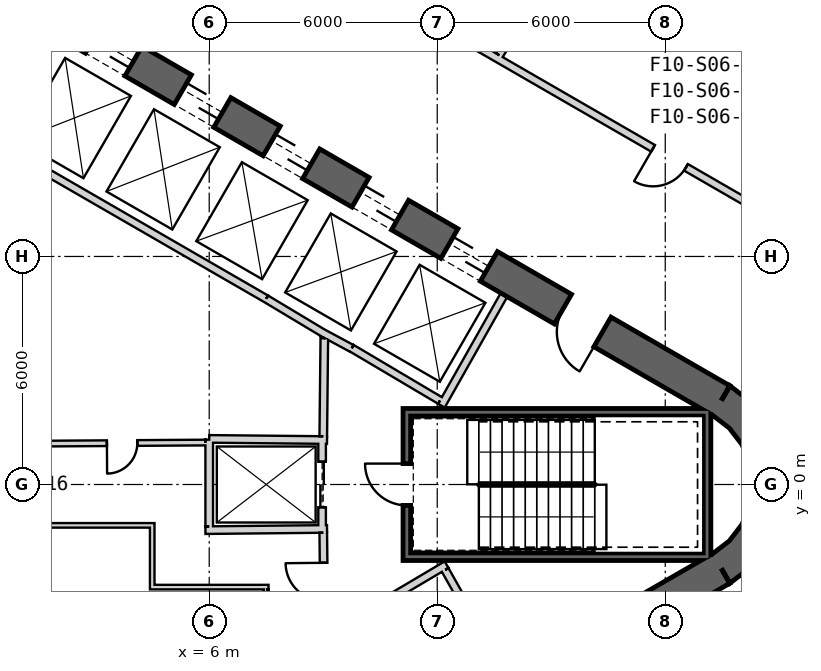
"""IFC4 building model, lengths in metres.
Left out: names, types, materials, properties, quantities, classifications, styles, units other than length and angle.
Written with IfcOpenShell. Run it as: python <this file> out.ifc"""

import sys

from ifc_helpers import new_model, si_unit, direction, frame, frame_2d, origin, place, context, subcontext, project, spatial, polyline, rectangle, outline, extrude, element, fill, save


model = new_model("IFC4")
c1 = context("Model", 3, precision=1e-05, world=origin(), true_north=direction((0.0, 1.0)))
c2 = subcontext(c1, "Body", "Model", "MODEL_VIEW")
j1 = project(units=[si_unit("LENGTHUNIT", "METRE"), si_unit("PLANEANGLEUNIT", "RADIAN")], contexts=[c1])
p1 = place(None, origin())
s1 = spatial("IfcSite", under=j1, at=p1, CompositionType="ELEMENT")
p2 = place(p1, origin())
s2 = spatial("IfcBuilding", under=s1, at=p2, CompositionType="ELEMENT")
p3 = place(p2, frame((0.0, 0.0, 119.3)))
s3 = spatial("IfcBuildingStorey", under=s2, at=p3, CompositionType="ELEMENT", Elevation=119.3)
p4 = place(p3, frame((19.475, 2.208, 0.0), z_axis=(0.0, 0.0, 1.0), x_axis=(-0.866028369851, 0.499994862586, 0.0)))
e1 = element("IfcWall", 1, at=p4, inside=s3, PredefinedType="SHEAR", context=c2, shape_type="SweptSolid", body=[
    extrude(rectangle(XDim=31.523, YDim=0.9, at=frame_2d((15.762, 0.0))), origin(), (0.0, 0.0, 1.0), 4.1),
])
p5 = place(p4, frame((7.062, 0.0, 0.0)))
e2 = element("IfcOpeningElement", 2, at=p5, cuts=e1, PredefinedType="OPENING", context=c2, shape_type="SweptSolid", body=[
    extrude(rectangle(XDim=1.2, YDim=2.4, at=frame_2d((0.6, 1.2))), frame((0.0, 0.46, 0.0), z_axis=(0.0, -1.0, 0.0), x_axis=(1.0, 0.0, 0.0)), (0.0, 0.0, 1.0), 0.92),
])
p6 = place(p4, frame((9.762, 0.0, 0.0)))
e3 = element("IfcOpeningElement", 3, at=p6, cuts=e1, PredefinedType="OPENING", context=c2, shape_type="SweptSolid", body=[
    extrude(rectangle(XDim=1.2, YDim=2.4, at=frame_2d((0.6, 1.2))), frame((0.0, 0.46, 0.0), z_axis=(0.0, -1.0, 0.0), x_axis=(1.0, 0.0, 0.0)), (0.0, 0.0, 1.0), 0.92),
])
p7 = place(p4, frame((12.462, 0.0, 0.0)))
e4 = element("IfcOpeningElement", 4, at=p7, cuts=e1, PredefinedType="OPENING", context=c2, shape_type="SweptSolid", body=[
    extrude(rectangle(XDim=1.2, YDim=2.4, at=frame_2d((0.6, 1.2))), frame((0.0, 0.46, 0.0), z_axis=(0.0, -1.0, 0.0), x_axis=(1.0, 0.0, 0.0)), (0.0, 0.0, 1.0), 0.92),
])
p8 = place(p4, frame((15.162, 0.0, 0.0)))
e5 = element("IfcOpeningElement", 5, at=p8, cuts=e1, PredefinedType="OPENING", context=c2, shape_type="SweptSolid", body=[
    extrude(rectangle(XDim=1.2, YDim=2.4, at=frame_2d((0.6, 1.2))), frame((0.0, 0.46, 0.0), z_axis=(0.0, -1.0, 0.0), x_axis=(1.0, 0.0, 0.0)), (0.0, 0.0, 1.0), 0.92),
])
p9 = place(p4, frame((17.862, 0.0, 0.0)))
e6 = element("IfcOpeningElement", 6, at=p9, cuts=e1, PredefinedType="OPENING", context=c2, shape_type="SweptSolid", body=[
    extrude(rectangle(XDim=1.2, YDim=2.4, at=frame_2d((0.6, 1.2))), frame((0.0, 0.46, 0.0), z_axis=(0.0, -1.0, 0.0), x_axis=(1.0, 0.0, 0.0)), (0.0, 0.0, 1.0), 0.92),
])
p10 = place(p4, frame((20.562, 0.0, 0.0)))
e7 = element("IfcOpeningElement", 7, at=p10, cuts=e1, PredefinedType="OPENING", context=c2, shape_type="SweptSolid", body=[
    extrude(rectangle(XDim=1.2, YDim=2.4, at=frame_2d((0.6, 1.2))), frame((0.0, 0.46, 0.0), z_axis=(0.0, -1.0, 0.0), x_axis=(1.0, 0.0, 0.0)), (0.0, 0.0, 1.0), 0.92),
])
p11 = place(p4, frame((23.262, 0.0, 0.0)))
e8 = element("IfcOpeningElement", 8, at=p11, cuts=e1, PredefinedType="OPENING", context=c2, shape_type="SweptSolid", body=[
    extrude(rectangle(XDim=1.2, YDim=2.4, at=frame_2d((0.6, 1.2))), frame((0.0, 0.46, 0.0), z_axis=(0.0, -1.0, 0.0), x_axis=(1.0, 0.0, 0.0)), (0.0, 0.0, 1.0), 0.92),
])
p12 = place(p4, frame((3.612, 0.0, 0.0)))
e9 = element("IfcOpeningElement", 9, at=p12, cuts=e1, PredefinedType="OPENING", context=c2, shape_type="SweptSolid", body=[
    extrude(rectangle(XDim=1.2, YDim=2.4, at=frame_2d((0.6, 1.2))), frame((0.0, 0.46, 0.0), z_axis=(0.0, -1.0, 0.0), x_axis=(1.0, 0.0, 0.0)), (0.0, 0.0, 1.0), 0.92),
])
p13 = place(p4, frame((26.712, 0.0, 0.0)))
e10 = element("IfcOpeningElement", 10, at=p13, cuts=e1, PredefinedType="OPENING", context=c2, shape_type="SweptSolid", body=[
    extrude(rectangle(XDim=1.2, YDim=2.4, at=frame_2d((0.6, 1.2))), frame((0.0, 0.46, 0.0), z_axis=(0.0, -1.0, 0.0), x_axis=(1.0, 0.0, 0.0)), (0.0, 0.0, 1.0), 0.92),
])
p14 = place(p3, frame((-7.825, -17.97, 0.0), z_axis=(0.0, 0.0, 1.0), x_axis=(0.866028369851, 0.499994862586, 0.0)))
e11 = element("IfcWall", 11, at=p14, inside=s3, PredefinedType="SHEAR", context=c2, shape_type="SweptSolid", body=[
    extrude(rectangle(XDim=31.523, YDim=0.9, at=frame_2d((15.762, 0.0))), origin(), (0.0, 0.0, 1.0), 4.1),
])
p15 = place(p14, frame((7.062, 0.0, 0.0)))
e12 = element("IfcOpeningElement", 12, at=p15, cuts=e11, PredefinedType="OPENING", context=c2, shape_type="SweptSolid", body=[
    extrude(rectangle(XDim=1.2, YDim=2.4, at=frame_2d((0.6, 1.2))), frame((0.0, 0.46, 0.0), z_axis=(0.0, -1.0, 0.0), x_axis=(1.0, 0.0, 0.0)), (0.0, 0.0, 1.0), 0.92),
])
p16 = place(p14, frame((9.762, 0.0, 0.0)))
e13 = element("IfcOpeningElement", 13, at=p16, cuts=e11, PredefinedType="OPENING", context=c2, shape_type="SweptSolid", body=[
    extrude(rectangle(XDim=1.2, YDim=2.4, at=frame_2d((0.6, 1.2))), frame((0.0, 0.46, 0.0), z_axis=(0.0, -1.0, 0.0), x_axis=(1.0, 0.0, 0.0)), (0.0, 0.0, 1.0), 0.92),
])
p17 = place(p14, frame((12.462, 0.0, 0.0)))
e14 = element("IfcOpeningElement", 14, at=p17, cuts=e11, PredefinedType="OPENING", context=c2, shape_type="SweptSolid", body=[
    extrude(rectangle(XDim=1.2, YDim=2.4, at=frame_2d((0.6, 1.2))), frame((0.0, 0.46, 0.0), z_axis=(0.0, -1.0, 0.0), x_axis=(1.0, 0.0, 0.0)), (0.0, 0.0, 1.0), 0.92),
])
p18 = place(p14, frame((15.162, 0.0, 0.0)))
e15 = element("IfcOpeningElement", 15, at=p18, cuts=e11, PredefinedType="OPENING", context=c2, shape_type="SweptSolid", body=[
    extrude(rectangle(XDim=1.2, YDim=2.4, at=frame_2d((0.6, 1.2))), frame((0.0, 0.46, 0.0), z_axis=(0.0, -1.0, 0.0), x_axis=(1.0, 0.0, 0.0)), (0.0, 0.0, 1.0), 0.92),
])
p19 = place(p14, frame((17.862, 0.0, 0.0)))
e16 = element("IfcOpeningElement", 16, at=p19, cuts=e11, PredefinedType="OPENING", context=c2, shape_type="SweptSolid", body=[
    extrude(rectangle(XDim=1.2, YDim=2.4, at=frame_2d((0.6, 1.2))), frame((0.0, 0.46, 0.0), z_axis=(0.0, -1.0, 0.0), x_axis=(1.0, 0.0, 0.0)), (0.0, 0.0, 1.0), 0.92),
])
p20 = place(p14, frame((20.562, 0.0, 0.0)))
e17 = element("IfcOpeningElement", 17, at=p20, cuts=e11, PredefinedType="OPENING", context=c2, shape_type="SweptSolid", body=[
    extrude(rectangle(XDim=1.2, YDim=2.4, at=frame_2d((0.6, 1.2))), frame((0.0, 0.46, 0.0), z_axis=(0.0, -1.0, 0.0), x_axis=(1.0, 0.0, 0.0)), (0.0, 0.0, 1.0), 0.92),
])
p21 = place(p14, frame((26.712, 0.0, 0.0)))
e18 = element("IfcOpeningElement", 18, at=p21, cuts=e11, PredefinedType="OPENING", context=c2, shape_type="SweptSolid", body=[
    extrude(rectangle(XDim=1.2, YDim=2.4, at=frame_2d((0.6, 1.2))), frame((0.0, 0.46, 0.0), z_axis=(0.0, -1.0, 0.0), x_axis=(1.0, 0.0, 0.0)), (0.0, 0.0, 1.0), 0.92),
])
p22 = place(p14, frame((3.612, 0.0, 0.0)))
e19 = element("IfcOpeningElement", 19, at=p22, cuts=e11, PredefinedType="OPENING", context=c2, shape_type="SweptSolid", body=[
    extrude(rectangle(XDim=1.2, YDim=2.4, at=frame_2d((0.6, 1.2))), frame((0.0, 0.46, 0.0), z_axis=(0.0, -1.0, 0.0), x_axis=(1.0, 0.0, 0.0)), (0.0, 0.0, 1.0), 0.92),
])
p23 = place(p3, origin())
e20 = element("IfcWall", 20, at=p23, inside=s3, PredefinedType="SHEAR", context=c2, shape_type="SweptSolid", body=[
    extrude(outline(polyline([(19.7, -2.598), (20.321, -2.121), (20.798, -1.5), (21.098, -0.777), (21.2, 0.0), (21.098, 0.777), (20.798, 1.5), (20.321, 2.121), (19.7, 2.598), (19.25, 1.819), (19.685, 1.485), (20.019, 1.05), (20.229, 0.543), (20.3, 0.0), (20.229, -0.543), (20.019, -1.05), (19.685, -1.485), (19.25, -1.819), (19.7, -2.598)])), origin(), (0.0, 0.0, 1.0), 4.1),
])
p24 = place(p3, frame((7.497, 4.886, 0.0), z_axis=(0.0, 0.0, 1.0), x_axis=(-0.866030989016, 0.499990325971, 0.0)))
e21 = element("IfcWall", 21, at=p24, inside=s3, PredefinedType="PLUMBINGWALL", context=c2, shape_type="SweptSolid", body=[
    extrude(rectangle(XDim=8.1, YDim=0.2, at=frame_2d((4.05, 0.0))), origin(), (0.0, 0.0, 1.0), 3.8),
])
p25 = place(p3, frame((12.11, 2.073, 0.0), z_axis=(0.0, 0.0, 1.0), x_axis=(0.49196600604, 0.870614408852, 0.0)))
e22 = element("IfcWall", 22, at=p25, inside=s3, PredefinedType="PLUMBINGWALL", context=c2, shape_type="SweptSolid", body=[
    extrude(rectangle(XDim=3.35, YDim=0.2, at=frame_2d((1.675, 0.0))), origin(), (0.0, 0.0, 1.0), 3.8),
])
p26 = place(p3, frame((12.073, 2.211, 0.0), z_axis=(0.0, 0.0, 1.0), x_axis=(-0.860438357912, 0.509554542943, 0.0)))
e23 = element("IfcWall", 23, at=p26, inside=s3, PredefinedType="PLUMBINGWALL", context=c2, shape_type="SweptSolid", body=[
    extrude(rectangle(XDim=2.7, YDim=0.2, at=frame_2d((1.35, 0.0))), origin(), (0.0, 0.0, 1.0), 3.8),
])
p27 = place(p3, frame((9.748, 3.583, 0.0), z_axis=(0.0, 0.0, 1.0), x_axis=(-0.880917147855, 0.473270513147, 0.0)))
e24 = element("IfcWall", 24, at=p27, inside=s3, PredefinedType="PLUMBINGWALL", context=c2, shape_type="SweptSolid", body=[
    extrude(rectangle(XDim=0.878, YDim=0.2, at=frame_2d((0.439, 0.0))), origin(), (0.0, 0.0, 1.0), 3.8),
])
p28 = place(p3, frame((9.079, 3.937, 0.0), z_axis=(0.0, 0.0, 1.0), x_axis=(-0.857516281273, 0.51445682749, 0.0)))
e25 = element("IfcWall", 25, at=p28, inside=s3, PredefinedType="PLUMBINGWALL", context=c2, shape_type="SweptSolid", body=[
    extrude(rectangle(XDim=1.845, YDim=0.2, at=frame_2d((0.922, 0.0))), origin(), (0.0, 0.0, 1.0), 3.8),
])
p29 = place(p3, frame((19.2, 1.9, -0.3), z_axis=(0.0, 0.0, 1.0), x_axis=(-1.0, 0.0, 0.0)))
e26 = element("IfcWall", 26, at=p29, inside=s3, PredefinedType="SHEAR", context=c2, shape_type="SweptSolid", body=[
    extrude(rectangle(XDim=8.1, YDim=0.2, at=frame_2d((4.05, 0.0))), origin(), (0.0, 0.0, 1.0), 4.1),
])
p30 = place(p3, frame((19.1, -2.0, -0.3), z_axis=(0.0, 0.0, 1.0), x_axis=(0.0, 1.0, 0.0)))
e27 = element("IfcWall", 27, at=p30, inside=s3, PredefinedType="SHEAR", context=c2, shape_type="SweptSolid", body=[
    extrude(rectangle(XDim=3.8, YDim=0.2, at=frame_2d((1.9, 0.0))), origin(), (0.0, 0.0, 1.0), 4.1),
])
p31 = place(p3, frame((11.1, -1.9, -0.3), z_axis=(0.0, 0.0, 1.0), x_axis=(1.0, 0.0, 0.0)))
e28 = element("IfcWall", 28, at=p31, inside=s3, PredefinedType="SHEAR", context=c2, shape_type="SweptSolid", body=[
    extrude(rectangle(XDim=7.9, YDim=0.2, at=frame_2d((3.95, 0.0))), origin(), (0.0, 0.0, 1.0), 4.1),
])
p32 = place(p3, frame((11.2, -1.8, -0.3), z_axis=(0.0, 0.0, 1.0), x_axis=(0.0, 1.0, 0.0)))
e29 = element("IfcWall", 29, at=p32, inside=s3, PredefinedType="SHEAR", context=c2, shape_type="SweptSolid", body=[
    extrude(rectangle(XDim=3.6, YDim=0.2, at=frame_2d((1.8, 0.0))), origin(), (0.0, 0.0, 1.0), 4.1),
])
p33 = place(p32, frame((1.25, 0.0, 0.3)))
e30 = element("IfcOpeningElement", 30, at=p33, cuts=e29, PredefinedType="OPENING", context=c2, shape_type="SweptSolid", body=[
    extrude(rectangle(XDim=1.1, YDim=2.1, at=frame_2d((0.55, 1.05))), frame((0.0, 0.11, 0.0), z_axis=(0.0, -1.0, 0.0), x_axis=(1.0, 0.0, 0.0)), (0.0, 0.0, 1.0), 0.22),
])
p34 = place(p3, frame((8.97, 1.2, 0.0), z_axis=(0.0, 0.0, 1.0), x_axis=(0.0, -1.0, 0.0)))
e31 = element("IfcWall", 31, at=p34, inside=s3, PredefinedType="PLUMBINGWALL", context=c2, shape_type="SweptSolid", body=[
    extrude(rectangle(XDim=2.4, YDim=0.2, at=frame_2d((1.2, 0.0))), origin(), (0.0, 0.0, 1.0), 3.8),
])
p35 = place(p34, frame((0.6, 0.0, 0.0)))
e32 = element("IfcOpeningElement", 32, at=p35, cuts=e31, PredefinedType="OPENING", context=c2, shape_type="SweptSolid", body=[
    extrude(rectangle(XDim=1.2, YDim=2.4, at=frame_2d((0.6, 1.2))), frame((0.0, 0.11, 0.0), z_axis=(0.0, -1.0, 0.0), x_axis=(1.0, 0.0, 0.0)), (0.0, 0.0, 1.0), 0.22),
])
p36 = place(p3, frame((6.0, 1.2, 0.0), z_axis=(0.0, 0.0, 1.0), x_axis=(0.999949988, -0.010001074852, 0.0)))
e33 = element("IfcWall", 33, at=p36, inside=s3, PredefinedType="PLUMBINGWALL", context=c2, shape_type="SweptSolid", body=[
    extrude(rectangle(XDim=3.1, YDim=0.2, at=frame_2d((1.55, 0.0))), origin(), (0.0, 0.0, 1.0), 3.8),
])
p37 = place(p3, frame((5.9, -1.201, 0.0), z_axis=(0.0, 0.0, 1.0), x_axis=(0.999950064753, 0.009993397809, 0.0)))
e34 = element("IfcWall", 34, at=p37, inside=s3, PredefinedType="PLUMBINGWALL", context=c2, shape_type="SweptSolid", body=[
    extrude(rectangle(XDim=3.2, YDim=0.2, at=frame_2d((1.6, 0.0))), origin(), (0.0, 0.0, 1.0), 3.8),
])
p38 = place(p3, frame((6.0, -1.1, 0.0), z_axis=(0.0, 0.0, 1.0), x_axis=(0.0, 1.0, 0.0)))
e35 = element("IfcWall", 35, at=p38, inside=s3, PredefinedType="PLUMBINGWALL", context=c2, shape_type="SweptSolid", body=[
    extrude(rectangle(XDim=2.28, YDim=0.2, at=frame_2d((1.14, 0.0))), origin(), (0.0, 0.0, 1.0), 3.8),
])
p39 = place(p3, frame((12.245, -2.109, 0.0), z_axis=(0.0, 0.0, 1.0), x_axis=(-0.860414880418, -0.509594185166, 0.0)))
e36 = element("IfcWall", 36, at=p39, inside=s3, PredefinedType="PARTITIONING", context=c2, shape_type="SweptSolid", body=[
    extrude(rectangle(XDim=2.7, YDim=0.2, at=frame_2d((1.35, 0.0))), origin(), (0.0, 0.0, 1.0), 3.8),
])
p40 = place(p3, frame((13.758, -4.99, 0.0), z_axis=(0.0, 0.0, 1.0), x_axis=(-0.491993409184, 0.87059892334, 0.0)))
e37 = element("IfcWall", 37, at=p40, inside=s3, PredefinedType="PARTITIONING", context=c2, shape_type="SweptSolid", body=[
    extrude(rectangle(XDim=3.15, YDim=0.2, at=frame_2d((1.575, 0.0))), origin(), (0.0, 0.0, 1.0), 3.8),
])
p41 = place(p40, frame((1.175, 0.0, 0.0)))
e38 = element("IfcOpeningElement", 38, at=p41, cuts=e37, PredefinedType="OPENING", context=c2, shape_type="SweptSolid", body=[
    extrude(rectangle(XDim=0.8, YDim=2.1, at=frame_2d((0.4, 1.05))), frame((0.0, 0.11, 0.0), z_axis=(0.0, -1.0, 0.0), x_axis=(1.0, 0.0, 0.0)), (0.0, 0.0, 1.0), 0.22),
])
p42 = place(p3, frame((9.001, 1.27, 0.0), z_axis=(0.0, 0.0, 1.0), x_axis=(0.010784614026, 0.999941844359, 0.0)))
e39 = element("IfcWall", 39, at=p42, inside=s3, PredefinedType="PARTITIONING", context=c2, shape_type="SweptSolid", body=[
    extrude(rectangle(XDim=2.581, YDim=0.2, at=frame_2d((1.291, 0.0))), origin(), (0.0, 0.0, 1.0), 3.8),
])
p43 = place(p3, frame((9.029, -3.851, 0.0), z_axis=(0.0, 0.0, 1.0), x_axis=(-0.010783593937, 0.99994185536, 0.0)))
e40 = element("IfcWall", 40, at=p43, inside=s3, PredefinedType="PARTITIONING", context=c2, shape_type="SweptSolid", body=[
    extrude(rectangle(XDim=2.581, YDim=0.2, at=frame_2d((1.291, 0.0))), origin(), (0.0, 0.0, 1.0), 3.8),
])
p44 = place(p43, frame((0.791, 0.0, 0.0)))
e41 = element("IfcOpeningElement", 41, at=p44, cuts=e40, PredefinedType="OPENING", context=c2, shape_type="SweptSolid", body=[
    extrude(rectangle(XDim=1.0, YDim=2.1, at=frame_2d((0.5, 1.05))), frame((0.0, 0.11, 0.0), z_axis=(0.0, -1.0, 0.0), x_axis=(1.0, 0.0, 0.0)), (0.0, 0.0, 1.0), 0.22),
])
p45 = place(p3, frame((1.388, 1.074, 0.0), z_axis=(0.0, 0.0, 1.0), x_axis=(0.99997856967, 0.006546770205, 0.0)))
e42 = element("IfcWall", 42, at=p45, inside=s3, PredefinedType="PLUMBINGWALL", context=c2, shape_type="SweptSolid", body=[
    extrude(rectangle(XDim=4.512, YDim=0.15, at=frame_2d((2.256, 0.0))), origin(), (0.0, 0.0, 1.0), 3.8),
])
p46 = place(p45, frame((1.92, 0.0, 0.0)))
e43 = element("IfcOpeningElement", 43, at=p46, cuts=e42, PredefinedType="OPENING", context=c2, shape_type="SweptSolid", body=[
    extrude(rectangle(XDim=0.8, YDim=2.1, at=frame_2d((0.4, 1.05))), frame((0.0, 0.085, 0.0), z_axis=(0.0, -1.0, 0.0), x_axis=(1.0, 0.0, 0.0)), (0.0, 0.0, 1.0), 0.17),
])
p47 = place(p3, frame((4.56, -1.075, 0.0), z_axis=(0.0, 0.0, 1.0), x_axis=(-1.0, 0.0, 0.0)))
e44 = element("IfcWall", 44, at=p47, inside=s3, PredefinedType="PARTITIONING", context=c2, shape_type="SweptSolid", body=[
    extrude(rectangle(XDim=3.026, YDim=0.12, at=frame_2d((1.513, 0.0))), origin(), (0.0, 0.0, 1.0), 3.8),
])
p48 = place(p3, frame((4.5, -2.76, 0.0), z_axis=(0.0, 0.0, 1.0), x_axis=(0.0, 1.0, 0.0)))
e45 = element("IfcWall", 45, at=p48, inside=s3, PredefinedType="PARTITIONING", context=c2, shape_type="SweptSolid", body=[
    extrude(rectangle(XDim=1.625, YDim=0.12, at=frame_2d((0.812, 0.0))), origin(), (0.0, 0.0, 1.0), 3.8),
])
p49 = place(p3, frame((7.56, -2.7, 0.0), z_axis=(0.0, 0.0, 1.0), x_axis=(-1.0, 0.0, 0.0)))
e46 = element("IfcWall", 46, at=p49, inside=s3, PredefinedType="PARTITIONING", context=c2, shape_type="SweptSolid", body=[
    extrude(rectangle(XDim=3.0, YDim=0.12, at=frame_2d((1.5, 0.0))), origin(), (0.0, 0.0, 1.0), 3.8),
])
p50 = place(p3, frame((7.475, -4.865, 0.0), z_axis=(0.0, 0.0, 1.0), x_axis=(0.011716133148, 0.999931363757, 0.0)))
e47 = element("IfcWall", 47, at=p50, inside=s3, PredefinedType="PARTITIONING", context=c2, shape_type="SweptSolid", body=[
    extrude(rectangle(XDim=2.105, YDim=0.12, at=frame_2d((1.052, 0.0))), origin(), (0.0, 0.0, 1.0), 3.8),
])
p51 = place(p3, frame((22.727, 5.931, 0.0), z_axis=(0.0, 0.0, 1.0), x_axis=(-0.866024609098, 0.500001376435, 0.0)))
e48 = element("IfcWall", 48, at=p51, inside=s3, PredefinedType="PARTITIONING", context=c2, shape_type="SweptSolid", body=[
    extrude(rectangle(XDim=26.847, YDim=0.2, at=frame_2d((13.424, 0.0))), origin(), (0.0, 0.0, 1.0), 2.98),
])
p52 = place(p51, frame((16.578, 0.0, 0.0)))
e49 = element("IfcOpeningElement", 49, at=p52, cuts=e48, PredefinedType="OPENING", context=c2, shape_type="SweptSolid", body=[
    extrude(rectangle(XDim=1.0, YDim=2.1, at=frame_2d((0.5, 1.05))), frame((0.0, 0.11, 0.0), z_axis=(0.0, -1.0, 0.0), x_axis=(1.0, 0.0, 0.0)), (0.0, 0.0, 1.0), 0.22),
])
p53 = place(p51, frame((4.829, 0.0, 0.0)))
e50 = element("IfcOpeningElement", 50, at=p53, cuts=e48, PredefinedType="OPENING", context=c2, shape_type="SweptSolid", body=[
    extrude(rectangle(XDim=1.0, YDim=2.1, at=frame_2d((0.5, 1.05))), frame((0.0, 0.11, 0.0), z_axis=(0.0, -1.0, 0.0), x_axis=(1.0, 0.0, 0.0)), (0.0, 0.0, 1.0), 0.22),
])
p54 = place(p3, frame((19.541, 20.933, 0.0), z_axis=(0.0, 0.0, 1.0), x_axis=(-0.522401997829, -0.852699333097, 0.0)))
e51 = element("IfcWall", 51, at=p54, inside=s3, PredefinedType="PARTITIONING", context=c2, shape_type="SweptSolid", body=[
    extrude(rectangle(XDim=11.303, YDim=0.2, at=frame_2d((5.652, 0.0))), origin(), (0.0, 0.0, 1.0), 3.08),
])
p55 = place(p33, origin())
e52 = element("IfcDoor", 52, at=p55, inside=s3, OperationType="SINGLE_SWING_RIGHT", PredefinedType="USERDEFINED", context=c2, shape_type="SweptSolid", body=[
    extrude(rectangle(XDim=1.1, YDim=2.1, at=frame_2d((0.55, 1.05))), frame((0.0, 0.025, 0.0), z_axis=(0.0, -1.0, 0.0), x_axis=(1.0, 0.0, 0.0)), (0.0, 0.0, 1.0), 0.05),
])
fill(e30, e52)
p56 = place(p44, origin())
e53 = element("IfcDoor", 53, at=p56, inside=s3, OperationType="SINGLE_SWING_RIGHT", PredefinedType="USERDEFINED", context=c2, shape_type="SweptSolid", body=[
    extrude(rectangle(XDim=1.0, YDim=2.1, at=frame_2d((0.5, 1.05))), frame((0.0, 0.025, 0.0), z_axis=(0.0, -1.0, 0.0), x_axis=(1.0, 0.0, 0.0)), (0.0, 0.0, 1.0), 0.05),
])
fill(e41, e53)
p57 = place(p35, origin())
e54 = element("IfcDoor", 54, at=p57, inside=s3, OperationType="SLIDING_TO_LEFT", PredefinedType="USERDEFINED", context=c2, shape_type="SweptSolid", body=[
    extrude(rectangle(XDim=1.2, YDim=2.4, at=frame_2d((0.6, 1.2))), frame((0.0, 0.025, 0.0), z_axis=(0.0, -1.0, 0.0), x_axis=(1.0, 0.0, 0.0)), (0.0, 0.0, 1.0), 0.05),
])
fill(e32, e54)
p58 = place(p46, origin())
e55 = element("IfcDoor", 55, at=p58, inside=s3, OperationType="SINGLE_SWING_LEFT", PredefinedType="USERDEFINED", context=c2, shape_type="SweptSolid", body=[
    extrude(rectangle(XDim=0.8, YDim=2.1, at=frame_2d((0.4, 1.05))), frame((0.0, 0.025, 0.0), z_axis=(0.0, -1.0, 0.0), x_axis=(1.0, 0.0, 0.0)), (0.0, 0.0, 1.0), 0.05),
])
fill(e43, e55)
p59 = place(p53, origin())
e56 = element("IfcDoor", 56, at=p59, inside=s3, OperationType="SINGLE_SWING_LEFT", PredefinedType="USERDEFINED", context=c2, shape_type="SweptSolid", body=[
    extrude(rectangle(XDim=1.0, YDim=2.1, at=frame_2d((0.5, 1.05))), frame((0.0, 0.025, 0.0), z_axis=(0.0, -1.0, 0.0), x_axis=(1.0, 0.0, 0.0)), (0.0, 0.0, 1.0), 0.05),
])
fill(e50, e56)
p60 = place(p5, origin())
e57 = element("IfcDoor", 57, at=p60, inside=s3, OperationType="SLIDING_TO_LEFT", PredefinedType="USERDEFINED", context=c2, shape_type="SweptSolid", body=[
    extrude(rectangle(XDim=1.2, YDim=2.4, at=frame_2d((0.6, 1.2))), frame((0.0, 0.025, 0.0), z_axis=(0.0, -1.0, 0.0), x_axis=(1.0, 0.0, 0.0)), (0.0, 0.0, 1.0), 0.05),
])
fill(e2, e57)
p61 = place(p6, origin())
e58 = element("IfcDoor", 58, at=p61, inside=s3, OperationType="SLIDING_TO_LEFT", PredefinedType="USERDEFINED", context=c2, shape_type="SweptSolid", body=[
    extrude(rectangle(XDim=1.2, YDim=2.4, at=frame_2d((0.6, 1.2))), frame((0.0, 0.025, 0.0), z_axis=(0.0, -1.0, 0.0), x_axis=(1.0, 0.0, 0.0)), (0.0, 0.0, 1.0), 0.05),
])
fill(e3, e58)
p62 = place(p7, origin())
e59 = element("IfcDoor", 59, at=p62, inside=s3, OperationType="SLIDING_TO_LEFT", PredefinedType="USERDEFINED", context=c2, shape_type="SweptSolid", body=[
    extrude(rectangle(XDim=1.2, YDim=2.4, at=frame_2d((0.6, 1.2))), frame((0.0, 0.025, 0.0), z_axis=(0.0, -1.0, 0.0), x_axis=(1.0, 0.0, 0.0)), (0.0, 0.0, 1.0), 0.05),
])
fill(e4, e59)
p63 = place(p8, origin())
e60 = element("IfcDoor", 60, at=p63, inside=s3, OperationType="SLIDING_TO_LEFT", PredefinedType="USERDEFINED", context=c2, shape_type="SweptSolid", body=[
    extrude(rectangle(XDim=1.2, YDim=2.4, at=frame_2d((0.6, 1.2))), frame((0.0, 0.025, 0.0), z_axis=(0.0, -1.0, 0.0), x_axis=(1.0, 0.0, 0.0)), (0.0, 0.0, 1.0), 0.05),
])
fill(e5, e60)
p64 = place(p9, origin())
e61 = element("IfcDoor", 61, at=p64, inside=s3, OperationType="SLIDING_TO_LEFT", PredefinedType="USERDEFINED", context=c2, shape_type="SweptSolid", body=[
    extrude(rectangle(XDim=1.2, YDim=2.4, at=frame_2d((0.6, 1.2))), frame((0.0, 0.025, 0.0), z_axis=(0.0, -1.0, 0.0), x_axis=(1.0, 0.0, 0.0)), (0.0, 0.0, 1.0), 0.05),
])
fill(e6, e61)
p65 = place(p12, origin())
e62 = element("IfcDoor", 62, at=p65, inside=s3, OperationType="SINGLE_SWING_RIGHT", PredefinedType="USERDEFINED", context=c2, shape_type="SweptSolid", body=[
    extrude(rectangle(XDim=1.2, YDim=2.4, at=frame_2d((0.6, 1.2))), frame((0.0, 0.025, 0.0), z_axis=(0.0, -1.0, 0.0), x_axis=(1.0, 0.0, 0.0)), (0.0, 0.0, 1.0), 0.05),
])
fill(e9, e62)
save(model, sys.argv[1])
